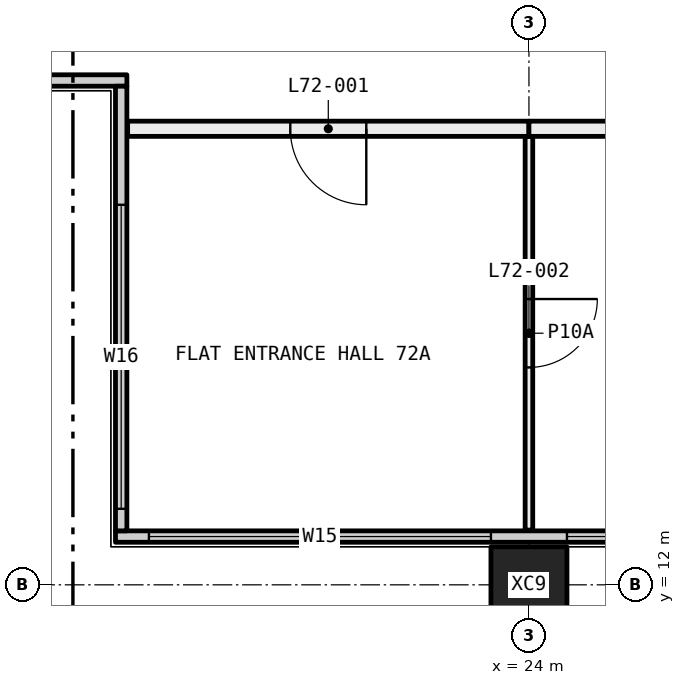
"""IFC4 building model, lengths in metres.
Left out: names, types, materials, properties, quantities, classifications, styles, units other than length and angle.
Written with IfcOpenShell. Run it as: python <this file> out.ifc"""

import sys

from ifc_helpers import new_model, si_unit, direction, frame, frame_2d, origin, origin_2d, place, context, subcontext, project, spatial, rectangle, hollow_rectangle, extrude, element, fill, save


model = new_model("IFC4")
c1 = context("Model", 3, precision=1e-05, world=origin(), true_north=direction((0.0, 1.0)))
c2 = subcontext(c1, "Body", "Model", "MODEL_VIEW")
j1 = project(units=[si_unit("LENGTHUNIT", "METRE"), si_unit("PLANEANGLEUNIT", "RADIAN")], contexts=[c1])
p1 = place(None, origin())
s1 = spatial("IfcSite", under=j1, at=p1, CompositionType="ELEMENT")
p2 = place(p1, origin())
s2 = spatial("IfcBuilding", under=s1, at=p2, CompositionType="ELEMENT")
p3 = place(p2, frame((0.0, 0.0, 266.25)))
s3 = spatial("IfcBuildingStorey", under=s2, at=p3, CompositionType="ELEMENT", Elevation=266.25)
p4 = place(p3, frame((24.0, 12.0, -0.4), z_axis=(0.0, 0.0, 1.0), x_axis=(1.0, 0.0, 0.0)))
e1 = element("IfcColumn", 1, at=p4, inside=s3, PredefinedType="COLUMN", context=c2, shape_type="SweptSolid", body=[
    extrude(hollow_rectangle(XDim=1.0, YDim=1.0, WallThickness=0.036, at=origin_2d()), origin(), (0.0, 0.0, 1.0), 3.45),
])
p5 = place(p3, frame((18.56, 12.635, 0.0), z_axis=(0.0, 0.0, 1.0), x_axis=(1.0, 0.0, 0.0)))
e2 = element("IfcWall", 2, at=p5, inside=s3, PredefinedType="ELEMENTEDWALL", context=c2, shape_type="SweptSolid", body=[
    extrude(rectangle(XDim=34.88, YDim=0.15, at=frame_2d((17.44, 0.0))), origin(), (0.0, 0.0, 1.0), 3.05),
])
p6 = place(p5, frame((0.44, 0.0, 0.45)))
e3 = element("IfcOpeningElement", 3, at=p6, cuts=e2, PredefinedType="OPENING", context=c2, shape_type="SweptSolid", body=[
    extrude(rectangle(XDim=4.5, YDim=2.55, at=frame_2d((2.25, 1.275))), frame((0.0, 0.085, 0.0), z_axis=(0.0, -1.0, 0.0), x_axis=(1.0, 0.0, 0.0)), (0.0, 0.0, 1.0), 0.17),
])
p7 = place(p5, frame((5.94, 0.0, 0.45)))
e4 = element("IfcOpeningElement", 4, at=p7, cuts=e2, PredefinedType="OPENING", context=c2, shape_type="SweptSolid", body=[
    extrude(rectangle(XDim=2.75, YDim=2.55, at=frame_2d((1.375, 1.275))), frame((0.0, 0.085, 0.0), z_axis=(0.0, -1.0, 0.0), x_axis=(1.0, 0.0, 0.0)), (0.0, 0.0, 1.0), 0.17),
])
p8 = place(p5, frame((14.94, 0.0, 0.45)))
e5 = element("IfcOpeningElement", 5, at=p8, cuts=e2, PredefinedType="OPENING", context=c2, shape_type="SweptSolid", body=[
    extrude(rectangle(XDim=2.0, YDim=2.55, at=frame_2d((1.0, 1.275))), frame((0.0, 0.085, 0.0), z_axis=(0.0, -1.0, 0.0), x_axis=(1.0, 0.0, 0.0)), (0.0, 0.0, 1.0), 0.17),
])
p9 = place(p5, frame((17.94, 0.0, 0.45)))
e6 = element("IfcOpeningElement", 6, at=p9, cuts=e2, PredefinedType="OPENING", context=c2, shape_type="SweptSolid", body=[
    extrude(rectangle(XDim=2.75, YDim=2.55, at=frame_2d((1.375, 1.275))), frame((0.0, 0.085, 0.0), z_axis=(0.0, -1.0, 0.0), x_axis=(1.0, 0.0, 0.0)), (0.0, 0.0, 1.0), 0.17),
])
p10 = place(p5, frame((26.19, 0.0, 0.45)))
e7 = element("IfcOpeningElement", 7, at=p10, cuts=e2, PredefinedType="OPENING", context=c2, shape_type="SweptSolid", body=[
    extrude(rectangle(XDim=2.75, YDim=2.55, at=frame_2d((1.375, 1.275))), frame((0.0, 0.085, 0.0), z_axis=(0.0, -1.0, 0.0), x_axis=(1.0, 0.0, 0.0)), (0.0, 0.0, 1.0), 0.17),
])
p11 = place(p5, frame((29.94, 0.0, 0.45)))
e8 = element("IfcOpeningElement", 8, at=p11, cuts=e2, PredefinedType="OPENING", context=c2, shape_type="SweptSolid", body=[
    extrude(rectangle(XDim=4.5, YDim=2.55, at=frame_2d((2.25, 1.275))), frame((0.0, 0.085, 0.0), z_axis=(0.0, -1.0, 0.0), x_axis=(1.0, 0.0, 0.0)), (0.0, 0.0, 1.0), 0.17),
])
p12 = place(p3, frame((12.56, 18.635, 0.0), z_axis=(0.0, 0.0, 1.0), x_axis=(1.0, 0.0, 0.0)))
e9 = element("IfcWall", 9, at=p12, inside=s3, PredefinedType="ELEMENTEDWALL", context=c2, shape_type="SweptSolid", body=[
    extrude(rectangle(XDim=6.15, YDim=0.15, at=frame_2d((3.075, 0.0))), origin(), (0.0, 0.0, 1.0), 3.05),
])
p13 = place(p12, frame((0.44, 0.0, 0.45)))
e10 = element("IfcOpeningElement", 10, at=p13, cuts=e9, PredefinedType="OPENING", context=c2, shape_type="SweptSolid", body=[
    extrude(rectangle(XDim=4.0, YDim=2.55, at=frame_2d((2.0, 1.275))), frame((0.0, 0.085, 0.0), z_axis=(0.0, -1.0, 0.0), x_axis=(1.0, 0.0, 0.0)), (0.0, 0.0, 1.0), 0.17),
])
p14 = place(p3, frame((18.635, 12.71, 0.0), z_axis=(0.0, 0.0, 1.0), x_axis=(0.0, 1.0, 0.0)))
e11 = element("IfcWall", 11, at=p14, inside=s3, PredefinedType="ELEMENTEDWALL", context=c2, shape_type="SweptSolid", body=[
    extrude(rectangle(XDim=5.85, YDim=0.15, at=frame_2d((2.925, 0.0))), origin(), (0.0, 0.0, 1.0), 3.05),
])
p15 = place(p14, frame((0.29, 0.0, 0.45)))
e12 = element("IfcOpeningElement", 12, at=p15, cuts=e11, PredefinedType="OPENING", context=c2, shape_type="SweptSolid", body=[
    extrude(rectangle(XDim=4.0, YDim=2.55, at=frame_2d((2.0, 1.275))), frame((0.0, 0.085, 0.0), z_axis=(0.0, -1.0, 0.0), x_axis=(1.0, 0.0, 0.0)), (0.0, 0.0, 1.0), 0.17),
])
p16 = place(p3, frame((24.0, 12.72, 0.0), z_axis=(0.0, 0.0, 1.0), x_axis=(0.0, 1.0, 0.0)))
e13 = element("IfcWall", 13, at=p16, inside=s3, PredefinedType="PARTITIONING", context=c2, shape_type="SweptSolid", body=[
    extrude(rectangle(XDim=5.18, YDim=0.1, at=frame_2d((2.59, 0.0))), origin(), (0.0, 0.0, 1.0), 3.05),
])
p17 = place(p16, frame((2.14, 0.0, 0.0)))
e14 = element("IfcOpeningElement", 14, at=p17, cuts=e13, PredefinedType="OPENING", context=c2, shape_type="SweptSolid", body=[
    extrude(rectangle(XDim=0.9, YDim=2.1, at=frame_2d((0.45, 1.05))), frame((0.0, 0.06, 0.0), z_axis=(0.0, -1.0, 0.0), x_axis=(1.0, 0.0, 0.0)), (0.0, 0.0, 1.0), 0.12),
])
p18 = place(p3, frame((24.0, 18.0, 0.0), z_axis=(0.0, 0.0, 1.0), x_axis=(-1.0, 0.0, 0.0)))
e15 = element("IfcWall", 15, at=p18, inside=s3, PredefinedType="PARTITIONING", context=c2, shape_type="SweptSolid", body=[
    extrude(rectangle(XDim=5.28, YDim=0.2, at=frame_2d((2.64, 0.0))), origin(), (0.0, 0.0, 1.0), 3.05),
])
p19 = place(p18, frame((2.14, 0.0, 0.0)))
e16 = element("IfcOpeningElement", 16, at=p19, cuts=e15, PredefinedType="OPENING", context=c2, shape_type="SweptSolid", body=[
    extrude(rectangle(XDim=1.0, YDim=2.1, at=frame_2d((0.5, 1.05))), frame((0.0, 0.11, 0.0), z_axis=(0.0, -1.0, 0.0), x_axis=(1.0, 0.0, 0.0)), (0.0, 0.0, 1.0), 0.22),
])
p20 = place(p3, frame((25.9, 18.0, 0.0), z_axis=(0.0, 0.0, 1.0), x_axis=(-1.0, 0.0, 0.0)))
e17 = element("IfcWall", 17, at=p20, inside=s3, PredefinedType="PARTITIONING", context=c2, shape_type="SweptSolid", body=[
    extrude(rectangle(XDim=1.9, YDim=0.2, at=frame_2d((0.95, 0.0))), origin(), (0.0, 0.0, 1.0), 3.05),
])
p21 = place(p6, origin())
e18 = element("IfcWindow", 18, at=p21, inside=s3, PartitioningType="SINGLE_PANEL", PredefinedType="WINDOW", context=c2, shape_type="SweptSolid", body=[
    extrude(rectangle(XDim=4.5, YDim=2.55, at=frame_2d((2.25, 1.275))), frame((0.0, 0.03, 0.0), z_axis=(0.0, -1.0, 0.0), x_axis=(1.0, 0.0, 0.0)), (0.0, 0.0, 1.0), 0.06),
])
fill(e3, e18)
p22 = place(p7, origin())
e19 = element("IfcWindow", 19, at=p22, inside=s3, PartitioningType="SINGLE_PANEL", PredefinedType="WINDOW", context=c2, shape_type="SweptSolid", body=[
    extrude(rectangle(XDim=2.75, YDim=2.55, at=frame_2d((1.375, 1.275))), frame((0.0, 0.03, 0.0), z_axis=(0.0, -1.0, 0.0), x_axis=(1.0, 0.0, 0.0)), (0.0, 0.0, 1.0), 0.06),
])
fill(e4, e19)
p23 = place(p15, origin())
e20 = element("IfcWindow", 20, at=p23, inside=s3, PartitioningType="SINGLE_PANEL", PredefinedType="WINDOW", context=c2, shape_type="SweptSolid", body=[
    extrude(rectangle(XDim=4.0, YDim=2.55, at=frame_2d((2.0, 1.275))), frame((0.0, 0.03, 0.0), z_axis=(0.0, -1.0, 0.0), x_axis=(1.0, 0.0, 0.0)), (0.0, 0.0, 1.0), 0.06),
])
fill(e12, e20)
p24 = place(p19, origin())
e21 = element("IfcDoor", 21, at=p24, inside=s3, OperationType="SINGLE_SWING_RIGHT", PredefinedType="DOOR", context=c2, shape_type="SweptSolid", body=[
    extrude(rectangle(XDim=1.0, YDim=2.1, at=frame_2d((0.5, 1.05))), frame((0.0, 0.025, 0.0), z_axis=(0.0, -1.0, 0.0), x_axis=(1.0, 0.0, 0.0)), (0.0, 0.0, 1.0), 0.05),
])
fill(e16, e21)
p25 = place(p17, frame((0.9, 0.0, 0.0), x_axis=(-1.0, 0.0, 0.0)))
e22 = element("IfcDoor", 22, at=p25, inside=s3, OperationType="SINGLE_SWING_RIGHT", PredefinedType="DOOR", context=c2, shape_type="SweptSolid", body=[
    extrude(rectangle(XDim=0.9, YDim=2.1, at=frame_2d((0.45, 1.05))), frame((0.0, 0.025, 0.0), z_axis=(0.0, -1.0, 0.0), x_axis=(1.0, 0.0, 0.0)), (0.0, 0.0, 1.0), 0.05),
])
fill(e14, e22)
save(model, sys.argv[1])
